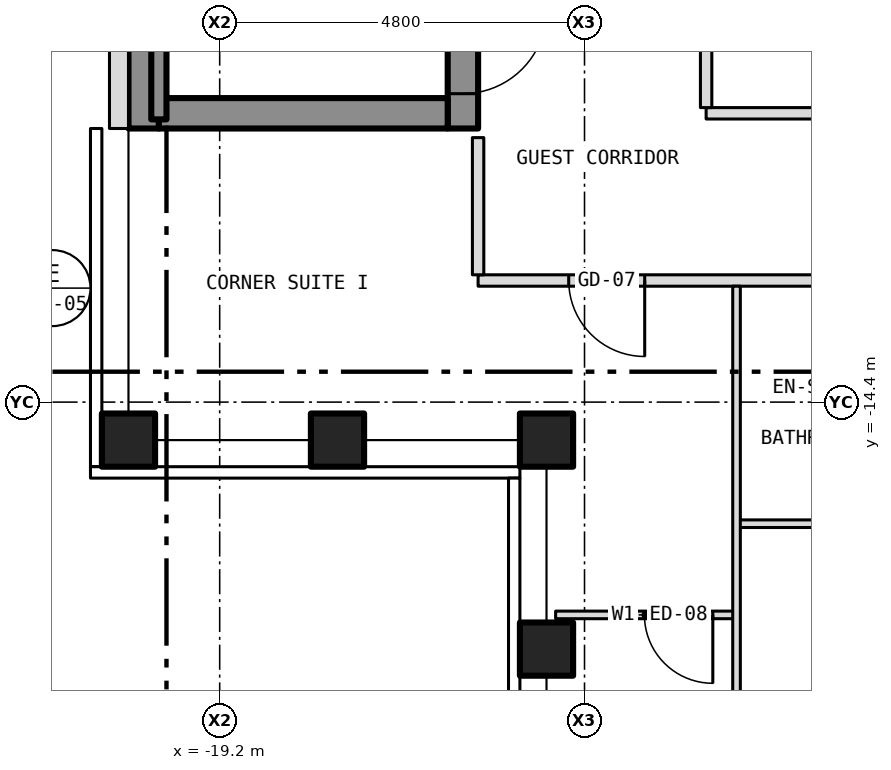
"""IFC4 building model, lengths in metres.
Left out: names, types, materials, properties, quantities, classifications, styles, units other than length and angle.
Written with IfcOpenShell. Run it as: python <this file> out.ifc"""

import sys

from ifc_helpers import new_model, si_unit, direction, frame, frame_2d, origin, origin_2d, place, context, subcontext, project, spatial, rectangle, hollow_rectangle, extrude, element, fill, save


model = new_model("IFC4")
c1 = context("Model", 3, precision=1e-05, world=origin(), true_north=direction((0.0, 1.0)))
c2 = subcontext(c1, "Body", "Model", "MODEL_VIEW")
j1 = project(units=[si_unit("LENGTHUNIT", "METRE"), si_unit("PLANEANGLEUNIT", "RADIAN")], contexts=[c1])
p1 = place(None, origin())
s1 = spatial("IfcSite", under=j1, at=p1, CompositionType="ELEMENT")
p2 = place(p1, origin())
s2 = spatial("IfcBuilding", under=s1, at=p2, CompositionType="ELEMENT")
p3 = place(p2, frame((0.0, 0.0, 208.5)))
s3 = spatial("IfcBuildingStorey", under=s2, at=p3, CompositionType="ELEMENT", Elevation=208.5)
for number, where, z_axis, x_axis in (
    (1, (-20.4, -14.9, -0.15), (0.0, 0.0, 1.0), (1.0, 0.0, 0.0)),
    (2, (-14.9, -14.9, -0.15), (0.0, 0.0, 1.0), (1.0, 0.0, 0.0)),
    (3, (-14.9, -17.65, -0.15), (0.0, 0.0, 1.0), (1.0, 0.0, 0.0)),
    (4, (-17.65, -14.9, -0.15), (0.0, 0.0, 1.0), (1.0, 0.0, 0.0)),
):
    element("IfcColumn", number, at=place(p3, frame(where, z_axis=z_axis, x_axis=x_axis)), inside=s3, PredefinedType="COLUMN", context=c2, shape_type="SweptSolid", body=[
        extrude(hollow_rectangle(XDim=0.7, YDim=0.7, WallThickness=0.04, at=origin_2d()), origin(), (0.0, 0.0, 1.0), 3.5),
    ])
p4 = place(p3, frame((-16.0, -10.8, 0.0), z_axis=(0.0, 0.0, 1.0), x_axis=(0.0, 1.0, 0.0)))
e5 = element("IfcWall", 5, at=p4, inside=s3, PredefinedType="SHEAR", context=c2, shape_type="SweptSolid", body=[
    extrude(rectangle(XDim=21.6, YDim=0.4, at=frame_2d((10.8, 0.0))), origin(), (0.0, 0.0, 1.0), 3.25),
])
p5 = place(p4, frame((9.4, 0.0, 0.0)))
e6 = element("IfcOpeningElement", 6, at=p5, cuts=e5, PredefinedType="OPENING", context=c2, shape_type="SweptSolid", body=[
    extrude(rectangle(XDim=1.1, YDim=2.1, at=frame_2d((0.55, 1.05))), frame((0.0, 0.212, 0.0), z_axis=(0.0, -1.0, 0.0), x_axis=(1.0, 0.0, 0.0)), (0.0, 0.0, 1.0), 0.424),
])
p6 = place(p4, frame((11.5, 0.0, 0.0)))
e7 = element("IfcOpeningElement", 7, at=p6, cuts=e5, PredefinedType="OPENING", context=c2, shape_type="SweptSolid", body=[
    extrude(rectangle(XDim=1.1, YDim=2.1, at=frame_2d((0.55, 1.05))), frame((0.0, 0.212, 0.0), z_axis=(0.0, -1.0, 0.0), x_axis=(1.0, 0.0, 0.0)), (0.0, 0.0, 1.0), 0.424),
])
p7 = place(p4, frame((13.6, 0.0, 0.0)))
e8 = element("IfcOpeningElement", 8, at=p7, cuts=e5, PredefinedType="OPENING", context=c2, shape_type="SweptSolid", body=[
    extrude(rectangle(XDim=1.1, YDim=2.1, at=frame_2d((0.55, 1.05))), frame((0.0, 0.212, 0.0), z_axis=(0.0, -1.0, 0.0), x_axis=(1.0, 0.0, 0.0)), (0.0, 0.0, 1.0), 0.424),
])
p8 = place(p4, frame((15.7, 0.0, 0.0)))
e9 = element("IfcOpeningElement", 9, at=p8, cuts=e5, PredefinedType="OPENING", context=c2, shape_type="SweptSolid", body=[
    extrude(rectangle(XDim=1.1, YDim=2.1, at=frame_2d((0.55, 1.05))), frame((0.0, 0.212, 0.0), z_axis=(0.0, -1.0, 0.0), x_axis=(1.0, 0.0, 0.0)), (0.0, 0.0, 1.0), 0.424),
])
p9 = place(p4, frame((17.8, 0.0, 0.0)))
e10 = element("IfcOpeningElement", 10, at=p9, cuts=e5, PredefinedType="OPENING", context=c2, shape_type="SweptSolid", body=[
    extrude(rectangle(XDim=1.1, YDim=2.1, at=frame_2d((0.55, 1.05))), frame((0.0, 0.212, 0.0), z_axis=(0.0, -1.0, 0.0), x_axis=(1.0, 0.0, 0.0)), (0.0, 0.0, 1.0), 0.424),
])
p10 = place(p4, frame((0.458, 0.0, 0.0)))
e11 = element("IfcOpeningElement", 11, at=p10, cuts=e5, PredefinedType="OPENING", context=c2, shape_type="SweptSolid", body=[
    extrude(rectangle(XDim=1.1, YDim=2.1, at=frame_2d((0.55, 1.05))), frame((0.0, 0.212, 0.0), z_axis=(0.0, -1.0, 0.0), x_axis=(1.0, 0.0, 0.0)), (0.0, 0.0, 1.0), 0.424),
])
p11 = place(p4, frame((7.5, 0.0, 0.0)))
e12 = element("IfcOpeningElement", 12, at=p11, cuts=e5, PredefinedType="OPENING", context=c2, shape_type="SweptSolid", body=[
    extrude(rectangle(XDim=1.1, YDim=2.1, at=frame_2d((0.55, 1.05))), frame((0.0, 0.212, 0.0), z_axis=(0.0, -1.0, 0.0), x_axis=(1.0, 0.0, 0.0)), (0.0, 0.0, 1.0), 0.424),
])
p12 = place(p4, frame((20.0, 0.0, 0.0)))
e13 = element("IfcOpeningElement", 13, at=p12, cuts=e5, PredefinedType="OPENING", context=c2, shape_type="SweptSolid", body=[
    extrude(rectangle(XDim=0.9, YDim=2.1, at=frame_2d((0.45, 1.05))), frame((0.0, 0.212, 0.0), z_axis=(0.0, -1.0, 0.0), x_axis=(1.0, 0.0, 0.0)), (0.0, 0.0, 1.0), 0.424),
])
p13 = place(p3, frame((-20.2, -10.8, 0.0), z_axis=(0.0, 0.0, 1.0), x_axis=(0.0, 1.0, 0.0)))
e14 = element("IfcWall", 14, at=p13, inside=s3, PredefinedType="SHEAR", context=c2, shape_type="SweptSolid", body=[
    extrude(rectangle(XDim=21.6, YDim=0.4, at=frame_2d((10.8, 0.0))), origin(), (0.0, 0.0, 1.0), 3.25),
])
p14 = place(p3, frame((-20.0, -10.6, 0.0), z_axis=(0.0, 0.0, 1.0), x_axis=(1.0, 0.0, 0.0)))
e15 = element("IfcWall", 15, at=p14, inside=s3, PredefinedType="SHEAR", context=c2, shape_type="SweptSolid", body=[
    extrude(rectangle(XDim=3.8, YDim=0.4, at=frame_2d((1.9, 0.0))), origin(), (0.0, 0.0, 1.0), 3.25),
])
p15 = place(p3, frame((-20.525, 10.8, 0.0), z_axis=(0.0, 0.0, 1.0), x_axis=(0.0, -1.0, 0.0)))
e16 = element("IfcWall", 16, at=p15, inside=s3, PredefinedType="SOLIDWALL", context=c2, shape_type="SweptSolid", body=[
    extrude(rectangle(XDim=21.6, YDim=0.25, at=frame_2d((10.8, 0.0))), origin(), (0.0, 0.0, 1.0), 3.5),
])
p16 = place(p15, frame((18.05, 0.0, 1.0)))
e17 = element("IfcOpeningElement", 17, at=p16, cuts=e16, PredefinedType="OPENING", context=c2, shape_type="SweptSolid", body=[
    extrude(rectangle(XDim=0.6, YDim=1.5, at=frame_2d((0.3, 0.75))), frame((0.0, 0.137, 0.0), z_axis=(0.0, -1.0, 0.0), x_axis=(1.0, 0.0, 0.0)), (0.0, 0.0, 1.0), 0.274),
])
p17 = place(p3, frame((-14.78, -17.2, 0.0), z_axis=(0.0, 0.0, 1.0), x_axis=(1.0, 0.0, 0.0)))
e18 = element("IfcWall", 18, at=p17, inside=s3, PredefinedType="PARTITIONING", context=c2, shape_type="SweptSolid", body=[
    extrude(rectangle(XDim=2.38, YDim=0.1, at=frame_2d((1.19, 0.0))), origin(), (0.0, 0.0, 1.0), 3.35),
])
p18 = place(p17, frame((1.168, 0.0, 0.0)))
e19 = element("IfcOpeningElement", 19, at=p18, cuts=e18, PredefinedType="OPENING", context=c2, shape_type="SweptSolid", body=[
    extrude(rectangle(XDim=0.9, YDim=2.1, at=frame_2d((0.45, 1.05))), frame((0.0, 0.062, 0.0), z_axis=(0.0, -1.0, 0.0), x_axis=(1.0, 0.0, 0.0)), (0.0, 0.0, 1.0), 0.124),
])
p19 = place(p3, frame((-12.4, -16.0, 0.0), z_axis=(0.0, 0.0, 1.0), x_axis=(1.0, 0.0, 0.0)))
e20 = element("IfcWall", 20, at=p19, inside=s3, PredefinedType="PARTITIONING", context=c2, shape_type="SweptSolid", body=[
    extrude(rectangle(XDim=2.2, YDim=0.1, at=frame_2d((1.1, 0.0))), origin(), (0.0, 0.0, 1.0), 3.35),
])
p20 = place(p3, frame((-15.8, -12.8, 0.0), z_axis=(0.0, 0.0, 1.0), x_axis=(1.0, 0.0, 0.0)))
e21 = element("IfcWall", 21, at=p20, inside=s3, PredefinedType="PARTITIONING", context=c2, shape_type="SweptSolid", body=[
    extrude(rectangle(XDim=31.6, YDim=0.15, at=frame_2d((15.8, 0.0))), origin(), (0.0, 0.0, 1.0), 3.35),
])
p21 = place(p20, frame((6.466, 0.0, 0.0)))
e22 = element("IfcOpeningElement", 22, at=p21, cuts=e21, PredefinedType="OPENING", context=c2, shape_type="SweptSolid", body=[
    extrude(rectangle(XDim=1.0, YDim=2.1, at=frame_2d((0.5, 1.05))), frame((0.0, 0.087, 0.0), z_axis=(0.0, -1.0, 0.0), x_axis=(1.0, 0.0, 0.0)), (0.0, 0.0, 1.0), 0.174),
])
p22 = place(p20, frame((15.548, 0.0, 0.0)))
e23 = element("IfcOpeningElement", 23, at=p22, cuts=e21, PredefinedType="OPENING", context=c2, shape_type="SweptSolid", body=[
    extrude(rectangle(XDim=1.0, YDim=2.1, at=frame_2d((0.5, 1.05))), frame((0.0, 0.087, 0.0), z_axis=(0.0, -1.0, 0.0), x_axis=(1.0, 0.0, 0.0)), (0.0, 0.0, 1.0), 0.174),
])
p23 = place(p20, frame((20.018, 0.0, 0.0)))
e24 = element("IfcOpeningElement", 24, at=p23, cuts=e21, PredefinedType="OPENING", context=c2, shape_type="SweptSolid", body=[
    extrude(rectangle(XDim=1.0, YDim=2.1, at=frame_2d((0.5, 1.05))), frame((0.0, 0.087, 0.0), z_axis=(0.0, -1.0, 0.0), x_axis=(1.0, 0.0, 0.0)), (0.0, 0.0, 1.0), 0.174),
])
p24 = place(p20, frame((1.192, 0.0, 0.0)))
e25 = element("IfcOpeningElement", 25, at=p24, cuts=e21, PredefinedType="OPENING", context=c2, shape_type="SweptSolid", body=[
    extrude(rectangle(XDim=1.0, YDim=2.1, at=frame_2d((0.5, 1.05))), frame((0.0, 0.087, 0.0), z_axis=(0.0, -1.0, 0.0), x_axis=(1.0, 0.0, 0.0)), (0.0, 0.0, 1.0), 0.174),
])
p25 = place(p20, frame((29.409, 0.0, 0.0)))
e26 = element("IfcOpeningElement", 26, at=p25, cuts=e21, PredefinedType="OPENING", context=c2, shape_type="SweptSolid", body=[
    extrude(rectangle(XDim=1.0, YDim=2.1, at=frame_2d((0.5, 1.05))), frame((0.0, 0.087, 0.0), z_axis=(0.0, -1.0, 0.0), x_axis=(1.0, 0.0, 0.0)), (0.0, 0.0, 1.0), 0.174),
])
p26 = place(p3, frame((-12.8, -10.6, 0.0), z_axis=(0.0, 0.0, 1.0), x_axis=(1.0, 0.0, 0.0)))
e27 = element("IfcWall", 27, at=p26, inside=s3, PredefinedType="PARTITIONING", context=c2, shape_type="SweptSolid", body=[
    extrude(rectangle(XDim=13.9, YDim=0.15, at=frame_2d((6.95, 0.0))), origin(), (0.0, 0.0, 1.0), 3.35),
])
p27 = place(p3, frame((-20.0, -10.68, 0.0), z_axis=(0.0, 0.0, 1.0), x_axis=(0.0, 1.0, 0.0)))
e28 = element("IfcWall", 28, at=p27, inside=s3, PredefinedType="SHEAR", context=c2, shape_type="SweptSolid", body=[
    extrude(rectangle(XDim=6.98, YDim=0.2, at=frame_2d((3.49, 0.0))), origin(), (0.0, 0.0, 1.0), 3.25),
])
p28 = place(p3, frame((-15.8, -12.725, 0.0), z_axis=(0.0, 0.0, 1.0), x_axis=(0.0, 1.0, 0.0)))
e29 = element("IfcWall", 29, at=p28, inside=s3, PredefinedType="PARTITIONING", context=c2, shape_type="SweptSolid", body=[
    extrude(rectangle(XDim=1.805, YDim=0.15, at=frame_2d((0.903, 0.0))), origin(), (0.0, 0.0, 1.0), 3.35),
])
p29 = place(p3, frame((-12.8, -10.525, 0.0), z_axis=(0.0, 0.0, 1.0), x_axis=(0.0, 1.0, 0.0)))
e30 = element("IfcWall", 30, at=p29, inside=s3, PredefinedType="PARTITIONING", context=c2, shape_type="SweptSolid", body=[
    extrude(rectangle(XDim=8.525, YDim=0.15, at=frame_2d((4.262, 0.0))), origin(), (0.0, 0.0, 1.0), 3.35),
])
p30 = place(p29, frame((3.825, 0.0, 0.0)))
e31 = element("IfcOpeningElement", 31, at=p30, cuts=e30, PredefinedType="OPENING", context=c2, shape_type="SweptSolid", body=[
    extrude(rectangle(XDim=0.9, YDim=2.1, at=frame_2d((0.45, 1.05))), frame((0.0, 0.087, 0.0), z_axis=(0.0, -1.0, 0.0), x_axis=(1.0, 0.0, 0.0)), (0.0, 0.0, 1.0), 0.174),
])
p31 = place(p3, frame((-12.4, -20.78, 0.0), z_axis=(0.0, 0.0, 1.0), x_axis=(0.0, 1.0, 0.0)))
e32 = element("IfcWall", 32, at=p31, inside=s3, PredefinedType="PARTITIONING", context=c2, shape_type="SweptSolid", body=[
    extrude(rectangle(XDim=7.905, YDim=0.1, at=frame_2d((3.953, 0.0))), origin(), (0.0, 0.0, 1.0), 3.35),
])
p32 = place(p10, origin())
e33 = element("IfcDoor", 33, at=p32, inside=s3, OperationType="SINGLE_SWING_RIGHT", PredefinedType="DOOR", context=c2, shape_type="SweptSolid", body=[
    extrude(rectangle(XDim=1.1, YDim=2.1, at=frame_2d((0.55, 1.05))), frame((0.0, 0.025, 0.0), z_axis=(0.0, -1.0, 0.0), x_axis=(1.0, 0.0, 0.0)), (0.0, 0.0, 1.0), 0.05),
])
fill(e11, e33)
p33 = place(p18, origin())
e34 = element("IfcDoor", 34, at=p33, inside=s3, OperationType="SINGLE_SWING_RIGHT", PredefinedType="DOOR", context=c2, shape_type="SweptSolid", body=[
    extrude(rectangle(XDim=0.9, YDim=2.1, at=frame_2d((0.45, 1.05))), frame((0.0, 0.025, 0.0), z_axis=(0.0, -1.0, 0.0), x_axis=(1.0, 0.0, 0.0)), (0.0, 0.0, 1.0), 0.05),
])
fill(e19, e34)
p34 = place(p24, origin())
e35 = element("IfcDoor", 35, at=p34, inside=s3, OperationType="SINGLE_SWING_RIGHT", PredefinedType="DOOR", context=c2, shape_type="SweptSolid", body=[
    extrude(rectangle(XDim=1.0, YDim=2.1, at=frame_2d((0.5, 1.05))), frame((0.0, 0.025, 0.0), z_axis=(0.0, -1.0, 0.0), x_axis=(1.0, 0.0, 0.0)), (0.0, 0.0, 1.0), 0.05),
])
fill(e25, e35)
save(model, sys.argv[1])
